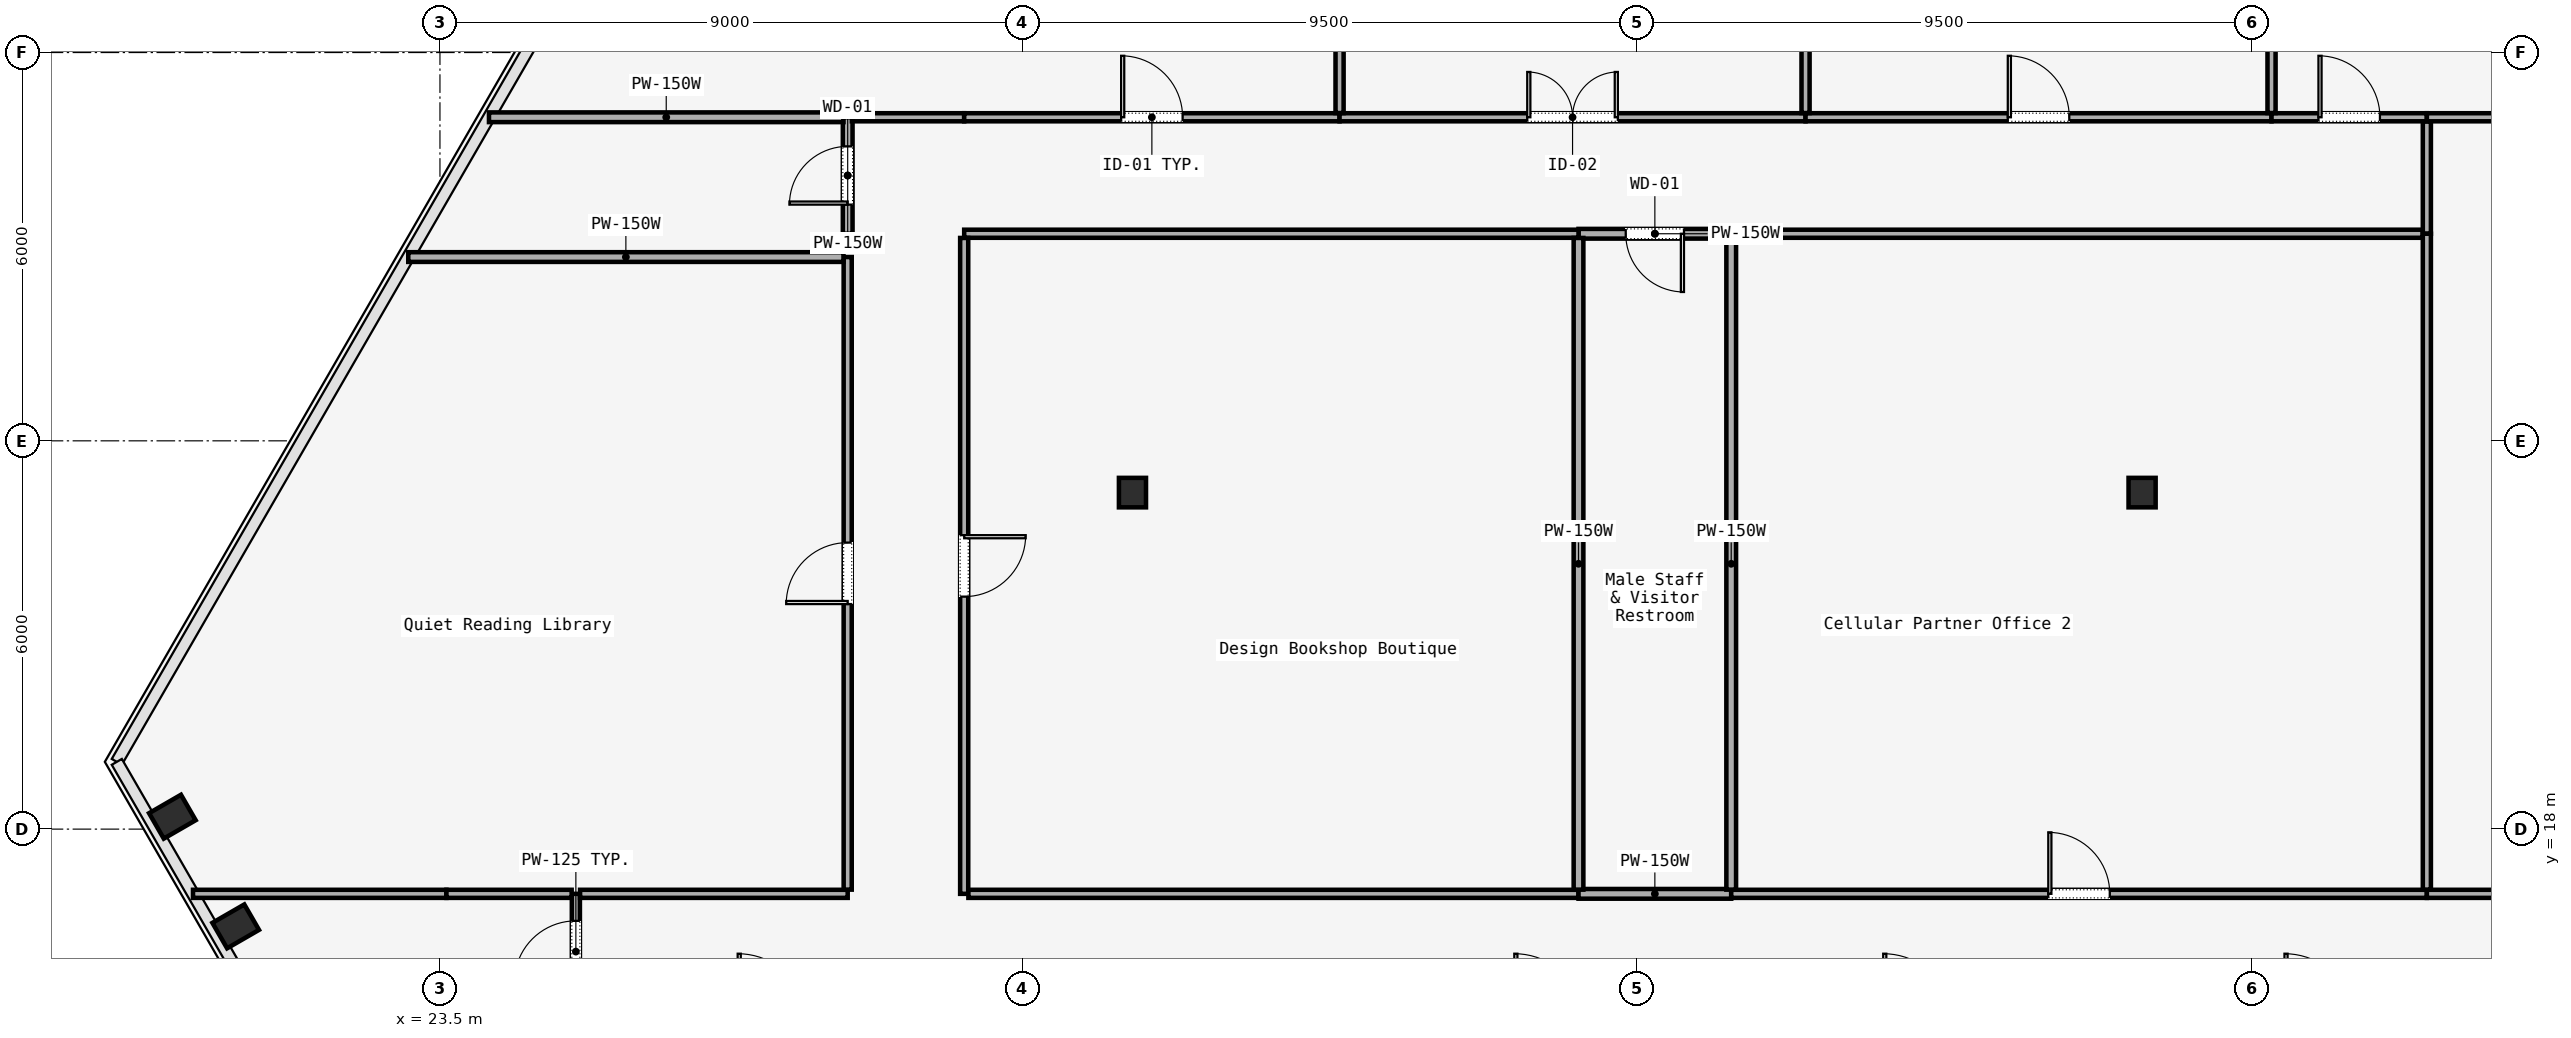
"""IFC4 building model, lengths in metres.
Left out: names, types, materials, properties, quantities, classifications, styles, units other than length and angle.
Written with IfcOpenShell. Run it as: python <this file> out.ifc"""

import sys

from ifc_helpers import new_model, si_unit, direction, frame, frame_2d, origin, origin_2d, place, context, subcontext, project, spatial, rectangle, i_section, extrude, element, fill, save


model = new_model("IFC4")
c1 = context("Model", 3, precision=1e-05, world=origin(), true_north=direction((0.0, 1.0)))
c2 = subcontext(c1, "Body", "Model", "MODEL_VIEW")
j1 = project(units=[si_unit("LENGTHUNIT", "METRE"), si_unit("PLANEANGLEUNIT", "RADIAN")], contexts=[c1])
p1 = place(None, origin())
s1 = spatial("IfcSite", under=j1, at=p1, CompositionType="ELEMENT")
p2 = place(p1, origin())
s2 = spatial("IfcBuilding", under=s1, at=p2, CompositionType="ELEMENT")
p3 = place(p2, frame((0.0, 0.0, 47.4)))
s3 = spatial("IfcBuildingStorey", under=s2, at=p3, CompositionType="ELEMENT", Elevation=47.4)
for number, where, z_axis, x_axis in (
    (1, (34.2, 23.2, 0.0), (0.0, 0.0, 1.0), (1.0, 0.0, 0.0)),
    (2, (49.8, 23.2, 0.0), (0.0, 0.0, 1.0), (1.0, 0.0, 0.0)),
):
    element("IfcColumn", number, at=place(p3, frame(where, z_axis=z_axis, x_axis=x_axis)), inside=s3, PredefinedType="COLUMN", context=c2, shape_type="SweptSolid", body=[
        extrude(i_section(OverallWidth=0.418, OverallDepth=0.456, WebThickness=0.042, FlangeThickness=0.067, FilletRadius=0.015, at=origin_2d()), origin(), (0.0, 0.0, 1.0), 3.58),
    ])
for number, where, z_axis, x_axis in (
    (3, (19.365, 18.192, 0.0), (0.0, 0.0, 1.0), (-0.5, 0.866, 0.0)),
    (4, (20.344, 16.497, 0.0), (0.0, 0.0, 1.0), (-0.5, 0.866, 0.0)),
):
    element("IfcColumn", number, at=place(p3, frame(where, z_axis=z_axis, x_axis=x_axis)), inside=s3, PredefinedType="COLUMN", context=c2, shape_type="SweptSolid", body=[
        extrude(i_section(OverallWidth=0.454, OverallDepth=0.569, WebThickness=0.078, FlangeThickness=0.08, FilletRadius=0.015, at=origin_2d()), origin(), (0.0, 0.0, 1.0), 3.58),
    ])
p4 = place(p3, frame((25.6, 15.215, 0.0), z_axis=(0.0, 0.0, 1.0), x_axis=(0.0, 1.0, 0.0)))
e5 = element("IfcWall", 5, at=p4, inside=s3, PredefinedType="PARTITIONING", context=c2, shape_type="SweptSolid", body=[
    extrude(rectangle(XDim=1.785, YDim=0.125, at=frame_2d((0.893, 0.0))), origin(), (0.0, 0.0, 1.0), 2.933),
])
p5 = place(p4, frame((0.417, 0.0, 0.0)))
e6 = element("IfcOpeningElement", 6, at=p5, cuts=e5, PredefinedType="OPENING", context=c2, shape_type="SweptSolid", body=[
    extrude(rectangle(XDim=0.95, YDim=2.2, at=frame_2d((0.475, 1.1))), frame((0.0, 0.062, 0.0), z_axis=(0.0, -1.0, 0.0), x_axis=(1.0, 0.0, 0.0)), (0.0, 0.0, 1.0), 0.125),
])
p6 = place(p3, frame((25.665, 17.0, 0.0), z_axis=(0.0, 0.0, 1.0), x_axis=(1.0, 0.0, 0.0)))
e7 = element("IfcWall", 7, at=p6, inside=s3, PredefinedType="PARTITIONING", context=c2, shape_type="SweptSolid", body=[
    extrude(rectangle(XDim=4.135, YDim=0.125, at=frame_2d((2.067, 0.0))), origin(), (0.0, 0.0, 1.0), 2.933),
])
p7 = place(p3, frame((29.8, 17.065, 0.0), z_axis=(0.0, 0.0, 1.0), x_axis=(0.0, 1.0, 0.0)))
e8 = element("IfcWall", 8, at=p7, inside=s3, PredefinedType="PARTITIONING", context=c2, shape_type="SweptSolid", body=[
    extrude(rectangle(XDim=9.775, YDim=0.125, at=frame_2d((4.888, 0.0))), origin(), (0.0, 0.0, 1.0), 2.933),
])
p8 = place(p7, frame((4.413, 0.0, 0.0)))
e9 = element("IfcOpeningElement", 9, at=p8, cuts=e8, PredefinedType="OPENING", context=c2, shape_type="SweptSolid", body=[
    extrude(rectangle(XDim=0.95, YDim=2.2, at=frame_2d((0.475, 1.1))), frame((0.0, 0.062, 0.0), z_axis=(0.0, -1.0, 0.0), x_axis=(1.0, 0.0, 0.0)), (0.0, 0.0, 1.0), 0.125),
])
p9 = place(p3, frame((29.8, 27.2, 0.0), z_axis=(0.0, 0.0, 1.0), x_axis=(0.0, 1.0, 0.0)))
e10 = element("IfcWall", 10, at=p9, inside=s3, PredefinedType="PARTITIONING", context=c2, shape_type="SweptSolid", body=[
    extrude(rectangle(XDim=1.8, YDim=0.15, at=frame_2d((0.9, 0.0))), origin(), (0.0, 0.0, 1.0), 2.933),
])
p10 = place(p9, frame((0.45, 0.0, 0.0)))
e11 = element("IfcOpeningElement", 11, at=p10, cuts=e10, PredefinedType="OPENING", context=c2, shape_type="SweptSolid", body=[
    extrude(rectangle(XDim=0.9, YDim=2.15, at=frame_2d((0.45, 1.075))), frame((0.0, 0.075, 0.0), z_axis=(0.0, -1.0, 0.0), x_axis=(1.0, 0.0, 0.0)), (0.0, 0.0, 1.0), 0.15),
])
p11 = place(p3, frame((29.865, 29.0, 0.0), z_axis=(0.0, 0.0, 1.0), x_axis=(1.0, 0.0, 0.0)))
e12 = element("IfcWall", 12, at=p11, inside=s3, PredefinedType="PARTITIONING", context=c2, shape_type="SweptSolid", body=[
    extrude(rectangle(XDim=1.735, YDim=0.125, at=frame_2d((0.868, 0.0))), origin(), (0.0, 0.0, 1.0), 2.933),
])
p12 = place(p3, frame((31.6, 29.0, 0.0), z_axis=(0.0, 0.0, 1.0), x_axis=(1.0, 0.0, 0.0)))
e13 = element("IfcWall", 13, at=p12, inside=s3, PredefinedType="PARTITIONING", context=c2, shape_type="SweptSolid", body=[
    extrude(rectangle(XDim=5.8, YDim=0.125, at=frame_2d((2.9, 0.0))), origin(), (0.0, 0.0, 1.0), 2.933),
])
p13 = place(p12, frame((2.425, 0.0, 0.0)))
e14 = element("IfcOpeningElement", 14, at=p13, cuts=e13, PredefinedType="OPENING", context=c2, shape_type="SweptSolid", body=[
    extrude(rectangle(XDim=0.95, YDim=2.2, at=frame_2d((0.475, 1.1))), frame((0.0, 0.062, 0.0), z_axis=(0.0, -1.0, 0.0), x_axis=(1.0, 0.0, 0.0)), (0.0, 0.0, 1.0), 0.125),
])
p14 = place(p3, frame((37.4, 29.0, 0.0), z_axis=(0.0, 0.0, 1.0), x_axis=(1.0, 0.0, 0.0)))
e15 = element("IfcWall", 15, at=p14, inside=s3, PredefinedType="PARTITIONING", context=c2, shape_type="SweptSolid", body=[
    extrude(rectangle(XDim=7.2, YDim=0.125, at=frame_2d((3.6, 0.0))), origin(), (0.0, 0.0, 1.0), 2.933),
])
p15 = place(p14, frame((2.9, 0.0, 0.0)))
e16 = element("IfcOpeningElement", 16, at=p15, cuts=e15, PredefinedType="OPENING", context=c2, shape_type="SweptSolid", body=[
    extrude(rectangle(XDim=1.4, YDim=2.2, at=frame_2d((0.7, 1.1))), frame((0.0, 0.062, 0.0), z_axis=(0.0, -1.0, 0.0), x_axis=(1.0, 0.0, 0.0)), (0.0, 0.0, 1.0), 0.125),
])
p16 = place(p3, frame((44.6, 29.0, 0.0), z_axis=(0.0, 0.0, 1.0), x_axis=(1.0, 0.0, 0.0)))
e17 = element("IfcWall", 17, at=p16, inside=s3, PredefinedType="PARTITIONING", context=c2, shape_type="SweptSolid", body=[
    extrude(rectangle(XDim=7.2, YDim=0.125, at=frame_2d((3.6, 0.0))), origin(), (0.0, 0.0, 1.0), 2.933),
])
p17 = place(p16, frame((3.125, 0.0, 0.0)))
e18 = element("IfcOpeningElement", 18, at=p17, cuts=e17, PredefinedType="OPENING", context=c2, shape_type="SweptSolid", body=[
    extrude(rectangle(XDim=0.95, YDim=2.2, at=frame_2d((0.475, 1.1))), frame((0.0, 0.062, 0.0), z_axis=(0.0, -1.0, 0.0), x_axis=(1.0, 0.0, 0.0)), (0.0, 0.0, 1.0), 0.125),
])
p18 = place(p3, frame((51.8, 29.0, 0.0), z_axis=(0.0, 0.0, 1.0), x_axis=(1.0, 0.0, 0.0)))
e19 = element("IfcWall", 19, at=p18, inside=s3, PredefinedType="PARTITIONING", context=c2, shape_type="SweptSolid", body=[
    extrude(rectangle(XDim=2.4, YDim=0.125, at=frame_2d((1.2, 0.0))), origin(), (0.0, 0.0, 1.0), 2.933),
])
p19 = place(p18, frame((0.725, 0.0, 0.0)))
e20 = element("IfcOpeningElement", 20, at=p19, cuts=e19, PredefinedType="OPENING", context=c2, shape_type="SweptSolid", body=[
    extrude(rectangle(XDim=0.95, YDim=2.2, at=frame_2d((0.475, 1.1))), frame((0.0, 0.062, 0.0), z_axis=(0.0, -1.0, 0.0), x_axis=(1.0, 0.0, 0.0)), (0.0, 0.0, 1.0), 0.125),
])
p20 = place(p3, frame((54.2, 28.935, 0.0), z_axis=(0.0, 0.0, 1.0), x_axis=(0.0, -1.0, 0.0)))
e21 = element("IfcWall", 21, at=p20, inside=s3, PredefinedType="PARTITIONING", context=c2, shape_type="SweptSolid", body=[
    extrude(rectangle(XDim=1.735, YDim=0.125, at=frame_2d((0.868, 0.0))), origin(), (0.0, 0.0, 1.0), 2.933),
])
p21 = place(p3, frame((54.135, 27.2, 0.0), z_axis=(0.0, 0.0, 1.0), x_axis=(-1.0, 0.0, 0.0)))
e22 = element("IfcWall", 22, at=p21, inside=s3, PredefinedType="PARTITIONING", context=c2, shape_type="SweptSolid", body=[
    extrude(rectangle(XDim=10.684, YDim=0.125, at=frame_2d((5.342, 0.0))), origin(), (0.0, 0.0, 1.0), 2.933),
])
p22 = place(p3, frame((43.451, 27.2, 0.0), z_axis=(0.0, 0.0, 1.0), x_axis=(-1.0, 0.0, 0.0)))
e23 = element("IfcWall", 23, at=p22, inside=s3, PredefinedType="PARTITIONING", context=c2, shape_type="SweptSolid", body=[
    extrude(rectangle(XDim=2.359, YDim=0.15, at=frame_2d((1.18, 0.0))), origin(), (0.0, 0.0, 1.0), 2.933),
])
p23 = place(p22, frame((0.73, 0.0, 0.0)))
e24 = element("IfcOpeningElement", 24, at=p23, cuts=e23, PredefinedType="OPENING", context=c2, shape_type="SweptSolid", body=[
    extrude(rectangle(XDim=0.9, YDim=2.15, at=frame_2d((0.45, 1.075))), frame((0.0, 0.075, 0.0), z_axis=(0.0, -1.0, 0.0), x_axis=(1.0, 0.0, 0.0)), (0.0, 0.0, 1.0), 0.15),
])
p24 = place(p3, frame((41.092, 27.2, 0.0), z_axis=(0.0, 0.0, 1.0), x_axis=(-1.0, 0.0, 0.0)))
e25 = element("IfcWall", 25, at=p24, inside=s3, PredefinedType="PARTITIONING", context=c2, shape_type="SweptSolid", body=[
    extrude(rectangle(XDim=9.492, YDim=0.125, at=frame_2d((4.746, 0.0))), origin(), (0.0, 0.0, 1.0), 2.933),
])
p25 = place(p3, frame((31.6, 27.135, 0.0), z_axis=(0.0, 0.0, 1.0), x_axis=(0.0, -1.0, 0.0)))
e26 = element("IfcWall", 26, at=p25, inside=s3, PredefinedType="PARTITIONING", context=c2, shape_type="SweptSolid", body=[
    extrude(rectangle(XDim=10.135, YDim=0.125, at=frame_2d((5.067, 0.0))), origin(), (0.0, 0.0, 1.0), 2.933),
])
p26 = place(p25, frame((4.593, 0.0, 0.0)))
e27 = element("IfcOpeningElement", 27, at=p26, cuts=e26, PredefinedType="OPENING", context=c2, shape_type="SweptSolid", body=[
    extrude(rectangle(XDim=0.95, YDim=2.2, at=frame_2d((0.475, 1.1))), frame((0.0, 0.062, 0.0), z_axis=(0.0, -1.0, 0.0), x_axis=(1.0, 0.0, 0.0)), (0.0, 0.0, 1.0), 0.125),
])
p27 = place(p3, frame((31.665, 17.0, 0.0), z_axis=(0.0, 0.0, 1.0), x_axis=(1.0, 0.0, 0.0)))
e28 = element("IfcWall", 28, at=p27, inside=s3, PredefinedType="PARTITIONING", context=c2, shape_type="SweptSolid", body=[
    extrude(rectangle(XDim=9.427, YDim=0.125, at=frame_2d((4.713, 0.0))), origin(), (0.0, 0.0, 1.0), 2.933),
])
p28 = place(p3, frame((41.092, 17.0, 0.0), z_axis=(0.0, 0.0, 1.0), x_axis=(1.0, 0.0, 0.0)))
e29 = element("IfcWall", 29, at=p28, inside=s3, PredefinedType="PARTITIONING", context=c2, shape_type="SweptSolid", body=[
    extrude(rectangle(XDim=2.359, YDim=0.15, at=frame_2d((1.18, 0.0))), origin(), (0.0, 0.0, 1.0), 2.933),
])
p29 = place(p3, frame((43.451, 17.0, 0.0), z_axis=(0.0, 0.0, 1.0), x_axis=(1.0, 0.0, 0.0)))
e30 = element("IfcWall", 30, at=p29, inside=s3, PredefinedType="PARTITIONING", context=c2, shape_type="SweptSolid", body=[
    extrude(rectangle(XDim=10.749, YDim=0.125, at=frame_2d((5.374, 0.0))), origin(), (0.0, 0.0, 1.0), 2.933),
])
p30 = place(p29, frame((4.899, 0.0, 0.0)))
e31 = element("IfcOpeningElement", 31, at=p30, cuts=e30, PredefinedType="OPENING", context=c2, shape_type="SweptSolid", body=[
    extrude(rectangle(XDim=0.95, YDim=2.2, at=frame_2d((0.475, 1.1))), frame((0.0, 0.062, 0.0), z_axis=(0.0, -1.0, 0.0), x_axis=(1.0, 0.0, 0.0)), (0.0, 0.0, 1.0), 0.125),
])
p31 = place(p3, frame((54.2, 17.0, 0.0), z_axis=(0.0, 0.0, 1.0), x_axis=(1.0, 0.0, 0.0)))
e32 = element("IfcWall", 32, at=p31, inside=s3, PredefinedType="PARTITIONING", context=c2, shape_type="SweptSolid", body=[
    extrude(rectangle(XDim=4.135, YDim=0.125, at=frame_2d((2.067, 0.0))), origin(), (0.0, 0.0, 1.0), 2.933),
])
p32 = place(p31, frame((1.593, 0.0, 0.0)))
e33 = element("IfcOpeningElement", 33, at=p32, cuts=e32, PredefinedType="OPENING", context=c2, shape_type="SweptSolid", body=[
    extrude(rectangle(XDim=0.95, YDim=2.2, at=frame_2d((0.475, 1.1))), frame((0.0, 0.062, 0.0), z_axis=(0.0, -1.0, 0.0), x_axis=(1.0, 0.0, 0.0)), (0.0, 0.0, 1.0), 0.125),
])
p33 = place(p3, frame((19.684, 17.0, 0.0), z_axis=(0.0, 0.0, 1.0), x_axis=(1.0, 0.0, 0.0)))
e34 = element("IfcWall", 34, at=p33, inside=s3, PredefinedType="PARTITIONING", context=c2, shape_type="SweptSolid", body=[
    extrude(rectangle(XDim=3.916, YDim=0.125, at=frame_2d((1.958, 0.0))), origin(), (0.0, 0.0, 1.0), 2.933),
])
p34 = place(p3, frame((23.6, 17.0, 0.0), z_axis=(0.0, 0.0, 1.0), x_axis=(1.0, 0.0, 0.0)))
e35 = element("IfcWall", 35, at=p34, inside=s3, PredefinedType="PARTITIONING", context=c2, shape_type="SweptSolid", body=[
    extrude(rectangle(XDim=1.935, YDim=0.125, at=frame_2d((0.967, 0.0))), origin(), (0.0, 0.0, 1.0), 2.933),
])
p35 = place(p3, frame((23.01, 26.84, 0.0), z_axis=(0.0, 0.0, 1.0), x_axis=(1.0, 0.0, 0.0)))
e36 = element("IfcWall", 36, at=p35, inside=s3, PredefinedType="PARTITIONING", context=c2, shape_type="SweptSolid", body=[
    extrude(rectangle(XDim=6.725, YDim=0.15, at=frame_2d((3.362, 0.0))), origin(), (0.0, 0.0, 1.0), 2.933),
])
for number, where, z_axis, x_axis in (
    (37, (41.092, 27.135, 0.0), (0.0, 0.0, 1.0), (0.0, -1.0, 0.0)),
    (38, (43.451, 27.135, 0.0), (0.0, 0.0, 1.0), (0.0, -1.0, 0.0)),
):
    element("IfcWall", number, at=place(p3, frame(where, z_axis=z_axis, x_axis=x_axis)), inside=s3, PredefinedType="PARTITIONING", context=c2, shape_type="SweptSolid", body=[
        extrude(rectangle(XDim=10.07, YDim=0.15, at=frame_2d((5.035, 0.0))), origin(), (0.0, 0.0, 1.0), 2.933),
    ])
p36 = place(p3, frame((54.2, 27.2, 0.0), z_axis=(0.0, 0.0, 1.0), x_axis=(0.0, -1.0, 0.0)))
e39 = element("IfcWall", 39, at=p36, inside=s3, PredefinedType="PARTITIONING", context=c2, shape_type="SweptSolid", body=[
    extrude(rectangle(XDim=10.135, YDim=0.125, at=frame_2d((5.067, 0.0))), origin(), (0.0, 0.0, 1.0), 2.933),
])
p37 = place(p3, frame((54.2, 29.0, 0.0), z_axis=(0.0, 0.0, 1.0), x_axis=(1.0, 0.0, 0.0)))
e40 = element("IfcWall", 40, at=p37, inside=s3, PredefinedType="PARTITIONING", context=c2, shape_type="SweptSolid", body=[
    extrude(rectangle(XDim=5.542, YDim=0.125, at=frame_2d((2.771, 0.0))), origin(), (0.0, 0.0, 1.0), 2.933),
])
p38 = place(p3, frame((24.258, 29.0, 0.0), z_axis=(0.0, 0.0, 1.0), x_axis=(1.0, 0.0, 0.0)))
e41 = element("IfcWall", 41, at=p38, inside=s3, PredefinedType="PARTITIONING", context=c2, shape_type="SweptSolid", body=[
    extrude(rectangle(XDim=5.478, YDim=0.15, at=frame_2d((2.739, 0.0))), origin(), (0.0, 0.0, 1.0), 2.933),
])
p39 = place(p3, frame((51.8, 29.065, 0.0), z_axis=(0.0, 0.0, 1.0), x_axis=(0.0, 1.0, 0.0)))
e42 = element("IfcWall", 42, at=p39, inside=s3, PredefinedType="PARTITIONING", context=c2, shape_type="SweptSolid", body=[
    extrude(rectangle(XDim=13.692, YDim=0.125, at=frame_2d((6.846, 0.0))), origin(), (0.0, 0.0, 1.0), 2.933),
])
for number, where, z_axis, x_axis in (
    (43, (37.4, 45.851, 0.0), (0.0, 0.0, 1.0), (0.0, -1.0, 0.0)),
    (44, (44.6, 29.065, 0.0), (0.0, 0.0, 1.0), (0.0, 1.0, 0.0)),
):
    element("IfcWall", number, at=place(p3, frame(where, z_axis=z_axis, x_axis=x_axis)), inside=s3, PredefinedType="PARTITIONING", context=c2, shape_type="SweptSolid", body=[
        extrude(rectangle(XDim=16.786, YDim=0.125, at=frame_2d((8.393, 0.0))), origin(), (0.0, 0.0, 1.0), 2.933),
    ])
p40 = place(p5, origin())
e45 = element("IfcDoor", 45, at=p40, inside=s3, OperationType="SINGLE_SWING_RIGHT", PredefinedType="DOOR", context=c2, shape_type="SweptSolid", body=[
    extrude(rectangle(XDim=0.95, YDim=2.2, at=frame_2d((0.475, 1.1))), frame((0.0, 0.025, 0.0), z_axis=(0.0, -1.0, 0.0), x_axis=(1.0, 0.0, 0.0)), (0.0, 0.0, 1.0), 0.05),
])
fill(e6, e45)
p41 = place(p8, origin())
e46 = element("IfcDoor", 46, at=p41, inside=s3, OperationType="SINGLE_SWING_RIGHT", PredefinedType="DOOR", context=c2, shape_type="SweptSolid", body=[
    extrude(rectangle(XDim=0.95, YDim=2.2, at=frame_2d((0.475, 1.1))), frame((0.0, 0.025, 0.0), z_axis=(0.0, -1.0, 0.0), x_axis=(1.0, 0.0, 0.0)), (0.0, 0.0, 1.0), 0.05),
])
fill(e9, e46)
p42 = place(p26, origin())
e47 = element("IfcDoor", 47, at=p42, inside=s3, OperationType="SINGLE_SWING_LEFT", PredefinedType="DOOR", context=c2, shape_type="SweptSolid", body=[
    extrude(rectangle(XDim=0.95, YDim=2.2, at=frame_2d((0.475, 1.1))), frame((0.0, 0.025, 0.0), z_axis=(0.0, -1.0, 0.0), x_axis=(1.0, 0.0, 0.0)), (0.0, 0.0, 1.0), 0.05),
])
fill(e27, e47)
p43 = place(p23, origin())
e48 = element("IfcDoor", 48, at=p43, inside=s3, OperationType="SINGLE_SWING_RIGHT", PredefinedType="DOOR", context=c2, shape_type="SweptSolid", body=[
    extrude(rectangle(XDim=0.9, YDim=2.15, at=frame_2d((0.45, 1.075))), frame((0.0, 0.025, 0.0), z_axis=(0.0, -1.0, 0.0), x_axis=(1.0, 0.0, 0.0)), (0.0, 0.0, 1.0), 0.05),
])
fill(e24, e48)
p44 = place(p30, origin())
e49 = element("IfcDoor", 49, at=p44, inside=s3, OperationType="SINGLE_SWING_LEFT", PredefinedType="DOOR", context=c2, shape_type="SweptSolid", body=[
    extrude(rectangle(XDim=0.95, YDim=2.2, at=frame_2d((0.475, 1.1))), frame((0.0, 0.025, 0.0), z_axis=(0.0, -1.0, 0.0), x_axis=(1.0, 0.0, 0.0)), (0.0, 0.0, 1.0), 0.05),
])
fill(e31, e49)
p45 = place(p10, origin())
e50 = element("IfcDoor", 50, at=p45, inside=s3, OperationType="SINGLE_SWING_LEFT", PredefinedType="DOOR", context=c2, shape_type="SweptSolid", body=[
    extrude(rectangle(XDim=0.9, YDim=2.15, at=frame_2d((0.45, 1.075))), frame((0.0, 0.025, 0.0), z_axis=(0.0, -1.0, 0.0), x_axis=(1.0, 0.0, 0.0)), (0.0, 0.0, 1.0), 0.05),
])
fill(e11, e50)
p46 = place(p19, origin())
e51 = element("IfcDoor", 51, at=p46, inside=s3, OperationType="SINGLE_SWING_RIGHT", PredefinedType="DOOR", context=c2, shape_type="SweptSolid", body=[
    extrude(rectangle(XDim=0.95, YDim=2.2, at=frame_2d((0.475, 1.1))), frame((0.0, 0.025, 0.0), z_axis=(0.0, -1.0, 0.0), x_axis=(1.0, 0.0, 0.0)), (0.0, 0.0, 1.0), 0.05),
])
fill(e20, e51)
p47 = place(p13, origin())
e52 = element("IfcDoor", 52, at=p47, inside=s3, OperationType="SINGLE_SWING_LEFT", PredefinedType="DOOR", context=c2, shape_type="SweptSolid", body=[
    extrude(rectangle(XDim=0.95, YDim=2.2, at=frame_2d((0.475, 1.1))), frame((0.0, 0.025, 0.0), z_axis=(0.0, -1.0, 0.0), x_axis=(1.0, 0.0, 0.0)), (0.0, 0.0, 1.0), 0.05),
])
fill(e14, e52)
p48 = place(p17, origin())
e53 = element("IfcDoor", 53, at=p48, inside=s3, OperationType="SINGLE_SWING_RIGHT", PredefinedType="DOOR", context=c2, shape_type="SweptSolid", body=[
    extrude(rectangle(XDim=0.95, YDim=2.2, at=frame_2d((0.475, 1.1))), frame((0.0, 0.025, 0.0), z_axis=(0.0, -1.0, 0.0), x_axis=(1.0, 0.0, 0.0)), (0.0, 0.0, 1.0), 0.05),
])
fill(e18, e53)
p49 = place(p15, origin())
e54 = element("IfcDoor", 54, at=p49, inside=s3, OperationType="SINGLE_SWING_LEFT", PredefinedType="DOOR", context=c2, shape_type="SweptSolid", body=[
    extrude(rectangle(XDim=1.4, YDim=2.2, at=frame_2d((0.7, 1.1))), frame((0.0, 0.025, 0.0), z_axis=(0.0, -1.0, 0.0), x_axis=(1.0, 0.0, 0.0)), (0.0, 0.0, 1.0), 0.05),
])
fill(e16, e54)
save(model, sys.argv[1])
